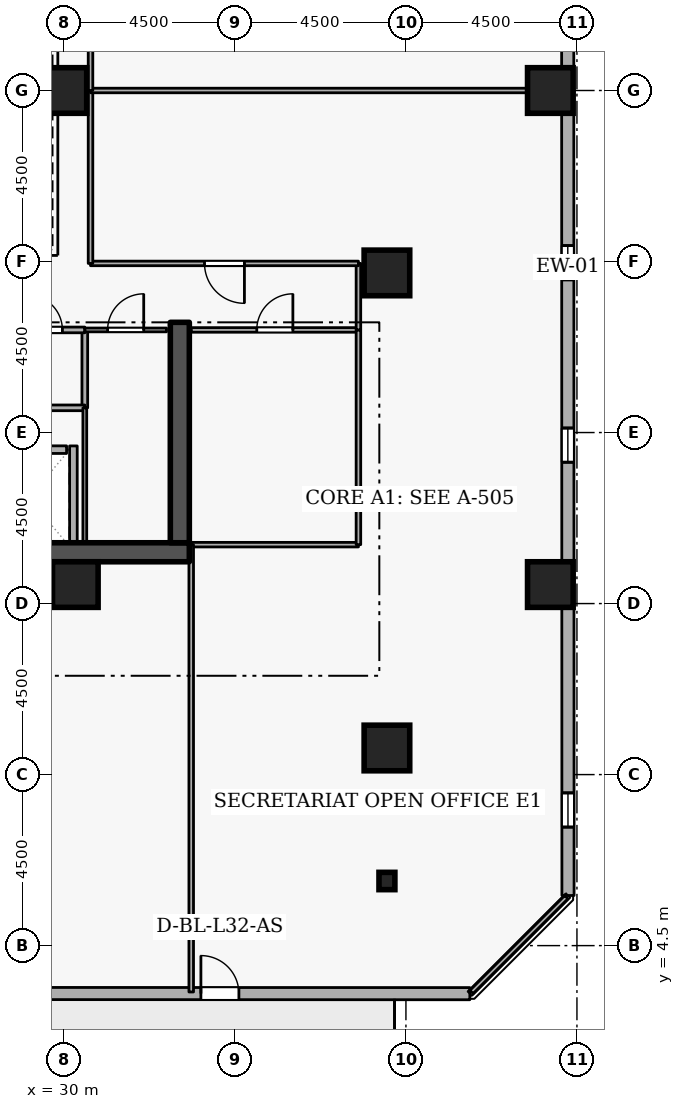
"""IFC4 building model, lengths in metres.
Left out: names, types, materials, properties, quantities, classifications, styles, units other than length and angle.
Written with IfcOpenShell. Run it as: python <this file> out.ifc"""

import sys

from ifc_helpers import new_model, si_unit, direction, frame, frame_2d, origin, origin_2d, place, context, subcontext, project, spatial, rectangle, i_section, extrude, element, fill, save


model = new_model("IFC4")
c1 = context("Model", 3, precision=1e-05, world=origin(), true_north=direction((0.0, 1.0)))
c2 = subcontext(c1, "Body", "Model", "MODEL_VIEW")
j1 = project(units=[si_unit("LENGTHUNIT", "METRE"), si_unit("PLANEANGLEUNIT", "RADIAN")], contexts=[c1])
p1 = place(None, origin())
s1 = spatial("IfcSite", under=j1, at=p1, CompositionType="ELEMENT")
p2 = place(p1, origin())
s2 = spatial("IfcBuilding", under=s1, at=p2, CompositionType="ELEMENT")
p3 = place(p2, frame((0.0, 0.0, 123.3)))
s3 = spatial("IfcBuildingStorey", under=s2, at=p3, CompositionType="ELEMENT", Elevation=123.3)
p4 = place(p3, frame((17.7, 14.85, 0.0), z_axis=(0.0, 0.0, 1.0), x_axis=(1.0, 0.0, 0.0)))
e1 = element("IfcWall", 1, at=p4, inside=s3, PredefinedType="SHEAR", context=c2, shape_type="SweptSolid", body=[
    extrude(rectangle(XDim=15.6, YDim=0.5, at=frame_2d((7.8, 0.0))), origin(), (0.0, 0.0, 1.0), 3.6),
])
p5 = place(p3, frame((33.05, 15.1, 0.0), z_axis=(0.0, 0.0, 1.0), x_axis=(0.0, 1.0, 0.0)))
e2 = element("IfcWall", 2, at=p5, inside=s3, PredefinedType="SHEAR", context=c2, shape_type="SweptSolid", body=[
    extrude(rectangle(XDim=5.8, YDim=0.5, at=frame_2d((2.9, 0.0))), origin(), (0.0, 0.0, 1.0), 3.6),
])
for number, where, z_axis, x_axis in (
    (3, (38.5, 9.7, 0.0), (0.0, 0.0, 1.0), (1.0, 0.0, 0.0)),
    (4, (42.8, 14.0, 0.0), (0.0, 0.0, 1.0), (1.0, 0.0, 0.0)),
    (5, (42.8, 27.0, 0.0), (0.0, 0.0, 1.0), (1.0, 0.0, 0.0)),
    (6, (38.5, 22.2, 0.0), (0.0, 0.0, 1.0), (1.0, 0.0, 0.0)),
    (7, (30.3, 14.0, 0.0), (0.0, 0.0, 1.0), (1.0, 0.0, 0.0)),
    (8, (30.0, 27.0, 0.0), (0.0, 0.0, 1.0), (1.0, 0.0, 0.0)),
):
    element("IfcColumn", number, at=place(p3, frame(where, z_axis=z_axis, x_axis=x_axis)), inside=s3, PredefinedType="COLUMN", context=c2, shape_type="SweptSolid", body=[
        extrude(rectangle(XDim=1.2, YDim=1.2, at=origin_2d()), origin(), (0.0, 0.0, 1.0), 3.6),
    ])
p6 = place(p3, frame((38.5, 6.2, 0.0), z_axis=(0.0, 0.0, 1.0), x_axis=(1.0, 0.0, 0.0)))
e9 = element("IfcColumn", 9, at=p6, inside=s3, PredefinedType="COLUMN", context=c2, shape_type="SweptSolid", body=[
    extrude(i_section(OverallWidth=0.418, OverallDepth=0.456, WebThickness=0.042, FlangeThickness=0.067, FilletRadius=0.015, at=origin_2d()), origin(), (0.0, 0.0, 1.0), 3.6),
])
p7 = place(p3, frame((7.628, 3.246, 0.0), z_axis=(0.0, 0.0, 1.0), x_axis=(0.999999944762, -0.000332378036, 0.0)))
e10 = element("IfcWall", 10, at=p7, inside=s3, PredefinedType="STANDARD", context=c2, shape_type="SweptSolid", body=[
    extrude(rectangle(XDim=33.054, YDim=0.32, at=frame_2d((16.527, 0.0))), origin(), (0.0, 0.0, 1.0), 2.7),
])
p8 = place(p7, frame((25.977, 0.0, 0.0)))
e11 = element("IfcOpeningElement", 11, at=p8, cuts=e10, PredefinedType="OPENING", context=c2, shape_type="SweptSolid", body=[
    extrude(rectangle(XDim=1.0, YDim=2.08, at=frame_2d((0.5, 1.04))), frame((0.0, 0.17, 0.0), z_axis=(0.0, -1.0, 0.0), x_axis=(1.0, 0.0, 0.0)), (0.0, 0.0, 1.0), 0.34),
])
p9 = place(p7, frame((1.8, 0.0, 0.72)))
e12 = element("IfcOpeningElement", 12, at=p9, cuts=e10, PredefinedType="OPENING", context=c2, shape_type="SweptSolid", body=[
    extrude(rectangle(XDim=0.9, YDim=1.75, at=frame_2d((0.45, 0.875))), frame((0.0, 0.17, 0.0), z_axis=(0.0, -1.0, 0.0), x_axis=(1.0, 0.0, 0.0)), (0.0, 0.0, 1.0), 0.34),
])
p10 = place(p7, frame((11.4, 0.0, 0.72)))
e13 = element("IfcOpeningElement", 13, at=p10, cuts=e10, PredefinedType="OPENING", context=c2, shape_type="SweptSolid", body=[
    extrude(rectangle(XDim=0.9, YDim=1.75, at=frame_2d((0.45, 0.875))), frame((0.0, 0.17, 0.0), z_axis=(0.0, -1.0, 0.0), x_axis=(1.0, 0.0, 0.0)), (0.0, 0.0, 1.0), 0.34),
])
p11 = place(p7, frame((16.2, 0.0, 0.72)))
e14 = element("IfcOpeningElement", 14, at=p11, cuts=e10, PredefinedType="OPENING", context=c2, shape_type="SweptSolid", body=[
    extrude(rectangle(XDim=0.9, YDim=1.75, at=frame_2d((0.45, 0.875))), frame((0.0, 0.17, 0.0), z_axis=(0.0, -1.0, 0.0), x_axis=(1.0, 0.0, 0.0)), (0.0, 0.0, 1.0), 0.34),
])
p12 = place(p7, frame((21.0, 0.0, 0.72)))
e15 = element("IfcOpeningElement", 15, at=p12, cuts=e10, PredefinedType="OPENING", context=c2, shape_type="SweptSolid", body=[
    extrude(rectangle(XDim=0.9, YDim=1.75, at=frame_2d((0.45, 0.875))), frame((0.0, 0.17, 0.0), z_axis=(0.0, -1.0, 0.0), x_axis=(1.0, 0.0, 0.0)), (0.0, 0.0, 1.0), 0.34),
])
p13 = place(p3, frame((43.265, 5.819, 0.0), z_axis=(0.0, 0.0, 1.0), x_axis=(-0.000332378036, 0.999999944762, 0.0)))
e16 = element("IfcWall", 16, at=p13, inside=s3, PredefinedType="STANDARD", context=c2, shape_type="SweptSolid", body=[
    extrude(rectangle(XDim=33.054, YDim=0.32, at=frame_2d((16.527, 0.0))), origin(), (0.0, 0.0, 1.0), 2.7),
])
p14 = place(p13, frame((1.8, 0.0, 0.72)))
e17 = element("IfcOpeningElement", 17, at=p14, cuts=e16, PredefinedType="OPENING", context=c2, shape_type="SweptSolid", body=[
    extrude(rectangle(XDim=0.9, YDim=1.75, at=frame_2d((0.45, 0.875))), frame((0.0, 0.17, 0.0), z_axis=(0.0, -1.0, 0.0), x_axis=(1.0, 0.0, 0.0)), (0.0, 0.0, 1.0), 0.34),
])
p15 = place(p13, frame((11.4, 0.0, 0.72)))
e18 = element("IfcOpeningElement", 18, at=p15, cuts=e16, PredefinedType="OPENING", context=c2, shape_type="SweptSolid", body=[
    extrude(rectangle(XDim=0.9, YDim=1.75, at=frame_2d((0.45, 0.875))), frame((0.0, 0.17, 0.0), z_axis=(0.0, -1.0, 0.0), x_axis=(1.0, 0.0, 0.0)), (0.0, 0.0, 1.0), 0.34),
])
p16 = place(p13, frame((16.2, 0.0, 0.72)))
e19 = element("IfcOpeningElement", 19, at=p16, cuts=e16, PredefinedType="OPENING", context=c2, shape_type="SweptSolid", body=[
    extrude(rectangle(XDim=0.9, YDim=1.75, at=frame_2d((0.45, 0.875))), frame((0.0, 0.17, 0.0), z_axis=(0.0, -1.0, 0.0), x_axis=(1.0, 0.0, 0.0)), (0.0, 0.0, 1.0), 0.34),
])
p17 = place(p13, frame((25.8, 0.0, 0.72)))
e20 = element("IfcOpeningElement", 20, at=p17, cuts=e16, PredefinedType="OPENING", context=c2, shape_type="SweptSolid", body=[
    extrude(rectangle(XDim=0.9, YDim=1.75, at=frame_2d((0.45, 0.875))), frame((0.0, 0.17, 0.0), z_axis=(0.0, -1.0, 0.0), x_axis=(1.0, 0.0, 0.0)), (0.0, 0.0, 1.0), 0.34),
])
p18 = place(p3, frame((28.08, 17.55, 0.0), z_axis=(0.0, 0.0, 1.0), x_axis=(1.0, 0.0, 0.0)))
e21 = element("IfcWall", 21, at=p18, inside=s3, PredefinedType="STANDARD", context=c2, shape_type="SweptSolid", body=[
    extrude(rectangle(XDim=1.99, YDim=0.2, at=frame_2d((0.995, 0.0))), origin(), (0.0, 0.0, 1.0), 3.34),
])
p19 = place(p3, frame((30.25, 15.112, 0.0), z_axis=(0.0, 0.0, 1.0), x_axis=(0.0, 1.0, 0.0)))
e22 = element("IfcWall", 22, at=p19, inside=s3, PredefinedType="STANDARD", context=c2, shape_type="SweptSolid", body=[
    extrude(rectangle(XDim=2.536, YDim=0.2, at=frame_2d((1.268, 0.0))), origin(), (0.0, 0.0, 1.0), 3.34),
])
p20 = place(p3, frame((30.55, 20.7, 0.0), z_axis=(0.0, 0.0, 1.0), x_axis=(0.0, -1.0, 0.0)))
e23 = element("IfcWall", 23, at=p20, inside=s3, PredefinedType="PARTITIONING", context=c2, shape_type="SweptSolid", body=[
    extrude(rectangle(XDim=2.05, YDim=0.15, at=frame_2d((1.025, 0.0))), origin(), (0.0, 0.0, 1.0), 3.34),
])
p21 = place(p3, frame((30.55, 18.65, 0.0), z_axis=(0.0, 0.0, 1.0), x_axis=(-1.0, 0.0, 0.0)))
e24 = element("IfcWall", 24, at=p21, inside=s3, PredefinedType="PARTITIONING", context=c2, shape_type="SweptSolid", body=[
    extrude(rectangle(XDim=2.1, YDim=0.15, at=frame_2d((1.05, 0.0))), origin(), (0.0, 0.0, 1.0), 3.34),
])
p22 = place(p3, frame((28.45, 20.7, 0.0), z_axis=(0.0, 0.0, 1.0), x_axis=(1.0, 0.0, 0.0)))
e25 = element("IfcWall", 25, at=p22, inside=s3, PredefinedType="PARTITIONING", context=c2, shape_type="SweptSolid", body=[
    extrude(rectangle(XDim=2.1, YDim=0.15, at=frame_2d((1.05, 0.0))), origin(), (0.0, 0.0, 1.0), 3.34),
])
p23 = place(p22, frame((0.59, 0.0, 0.0)))
e26 = element("IfcOpeningElement", 26, at=p23, cuts=e25, PredefinedType="OPENING", context=c2, shape_type="SweptSolid", body=[
    extrude(rectangle(XDim=0.92, YDim=2.08, at=frame_2d((0.46, 1.04))), frame((0.0, 0.085, 0.0), z_axis=(0.0, -1.0, 0.0), x_axis=(1.0, 0.0, 0.0)), (0.0, 0.0, 1.0), 0.17),
])
p24 = place(p3, frame((30.55, 15.1, 0.0), z_axis=(0.0, 0.0, 1.0), x_axis=(0.0, 1.0, 0.0)))
e27 = element("IfcWall", 27, at=p24, inside=s3, PredefinedType="PARTITIONING", context=c2, shape_type="SweptSolid", body=[
    extrude(rectangle(XDim=3.55, YDim=0.1, at=frame_2d((1.775, 0.0))), origin(), (0.0, 0.0, 1.0), 3.34),
])
p25 = place(p3, frame((30.55, 20.7, 0.0), z_axis=(0.0, 0.0, 1.0), x_axis=(1.0, 0.0, 0.0)))
e28 = element("IfcWall", 28, at=p25, inside=s3, PredefinedType="PARTITIONING", context=c2, shape_type="SweptSolid", body=[
    extrude(rectangle(XDim=2.15, YDim=0.1, at=frame_2d((1.075, 0.0))), origin(), (0.0, 0.0, 1.0), 3.34),
])
p26 = place(p25, frame((0.6, 0.0, 0.0)))
e29 = element("IfcOpeningElement", 29, at=p26, cuts=e28, PredefinedType="OPENING", context=c2, shape_type="SweptSolid", body=[
    extrude(rectangle(XDim=0.95, YDim=2.1, at=frame_2d((0.475, 1.05))), frame((0.0, 0.06, 0.0), z_axis=(0.0, -1.0, 0.0), x_axis=(1.0, 0.0, 0.0)), (0.0, 0.0, 1.0), 0.12),
])
p27 = place(p3, frame((37.75, 15.05, 0.0), z_axis=(0.0, 0.0, 1.0), x_axis=(-1.0, 0.0, 0.0)))
e30 = element("IfcWall", 30, at=p27, inside=s3, PredefinedType="PARTITIONING", context=c2, shape_type="SweptSolid", body=[
    extrude(rectangle(XDim=4.4, YDim=0.12, at=frame_2d((2.2, 0.0))), origin(), (0.0, 0.0, 1.0), 3.34),
])
p28 = place(p3, frame((33.35, 20.7, 0.0), z_axis=(0.0, 0.0, 1.0), x_axis=(1.0, 0.0, 0.0)))
e31 = element("IfcWall", 31, at=p28, inside=s3, PredefinedType="PARTITIONING", context=c2, shape_type="SweptSolid", body=[
    extrude(rectangle(XDim=4.4, YDim=0.12, at=frame_2d((2.2, 0.0))), origin(), (0.0, 0.0, 1.0), 3.34),
])
p29 = place(p28, frame((1.725, 0.0, 0.0)))
e32 = element("IfcOpeningElement", 32, at=p29, cuts=e31, PredefinedType="OPENING", context=c2, shape_type="SweptSolid", body=[
    extrude(rectangle(XDim=0.95, YDim=2.1, at=frame_2d((0.475, 1.05))), frame((0.0, 0.07, 0.0), z_axis=(0.0, -1.0, 0.0), x_axis=(1.0, 0.0, 0.0)), (0.0, 0.0, 1.0), 0.14),
])
p30 = place(p3, frame((37.75, 20.7, 0.0), z_axis=(0.0, 0.0, 1.0), x_axis=(0.0, -1.0, 0.0)))
e33 = element("IfcWall", 33, at=p30, inside=s3, PredefinedType="PARTITIONING", context=c2, shape_type="SweptSolid", body=[
    extrude(rectangle(XDim=5.65, YDim=0.12, at=frame_2d((2.825, 0.0))), origin(), (0.0, 0.0, 1.0), 3.34),
])
p31 = place(p3, frame((33.35, 3.28, 0.0), z_axis=(0.0, 0.0, 1.0), x_axis=(0.0, 1.0, 0.0)))
e34 = element("IfcWall", 34, at=p31, inside=s3, PredefinedType="PARTITIONING", context=c2, shape_type="SweptSolid", body=[
    extrude(rectangle(XDim=11.77, YDim=0.12, at=frame_2d((5.885, 0.0))), origin(), (0.0, 0.0, 1.0), 2.545),
])
p32 = place(p3, frame((37.75, 20.7, 0.0), z_axis=(0.0, 0.0, 1.0), x_axis=(0.0, 1.0, 0.0)))
e35 = element("IfcWall", 35, at=p32, inside=s3, PredefinedType="PARTITIONING", context=c2, shape_type="SweptSolid", body=[
    extrude(rectangle(XDim=1.75, YDim=0.12, at=frame_2d((0.875, 0.0))), origin(), (0.0, 0.0, 1.0), 3.34),
])
p33 = place(p3, frame((37.75, 22.45, 0.0), z_axis=(0.0, 0.0, 1.0), x_axis=(-1.0, 0.0, 0.0)))
e36 = element("IfcWall", 36, at=p33, inside=s3, PredefinedType="PARTITIONING", context=c2, shape_type="SweptSolid", body=[
    extrude(rectangle(XDim=7.05, YDim=0.12, at=frame_2d((3.525, 0.0))), origin(), (0.0, 0.0, 1.0), 3.34),
])
p34 = place(p33, frame((3.0, 0.0, 0.0)))
e37 = element("IfcOpeningElement", 37, at=p34, cuts=e36, PredefinedType="OPENING", context=c2, shape_type="SweptSolid", body=[
    extrude(rectangle(XDim=1.05, YDim=2.1, at=frame_2d((0.525, 1.05))), frame((0.0, 0.07, 0.0), z_axis=(0.0, -1.0, 0.0), x_axis=(1.0, 0.0, 0.0)), (0.0, 0.0, 1.0), 0.14),
])
p35 = place(p3, frame((30.7, 22.45, 0.0), z_axis=(0.0, 0.0, 1.0), x_axis=(0.0, 1.0, 0.0)))
e38 = element("IfcWall", 38, at=p35, inside=s3, PredefinedType="PARTITIONING", context=c2, shape_type="SweptSolid", body=[
    extrude(rectangle(XDim=4.55, YDim=0.12, at=frame_2d((2.275, 0.0))), origin(), (0.0, 0.0, 1.0), 3.34),
])
p36 = place(p3, frame((30.7, 27.0, 0.0), z_axis=(0.0, 0.0, 1.0), x_axis=(1.0, 0.0, 0.0)))
e39 = element("IfcWall", 39, at=p36, inside=s3, PredefinedType="PARTITIONING", context=c2, shape_type="SweptSolid", body=[
    extrude(rectangle(XDim=12.52, YDim=0.12, at=frame_2d((6.26, 0.0))), origin(), (0.0, 0.0, 1.0), 2.932),
])
p37 = place(p3, frame((43.22, 5.775, 0.0), z_axis=(0.0, 0.0, 1.0), x_axis=(-0.707106781187, -0.707106781187, 0.0)))
e40 = element("IfcWall", 40, at=p37, inside=s3, PredefinedType="PARTITIONING", context=c2, shape_type="SweptSolid", body=[
    extrude(rectangle(XDim=3.528, YDim=0.12, at=frame_2d((1.764, 0.0))), origin(), (0.0, 0.0, 1.0), 3.34),
])
p38 = place(p3, frame((30.7, 27.0, 0.0), z_axis=(0.0, 0.0, 1.0), x_axis=(0.0, 1.0, 0.0)))
e41 = element("IfcWall", 41, at=p38, inside=s3, PredefinedType="PARTITIONING", context=c2, shape_type="SweptSolid", body=[
    extrude(rectangle(XDim=4.55, YDim=0.12, at=frame_2d((2.275, 0.0))), origin(), (0.0, 0.0, 1.0), 3.34),
])
p39 = place(p8, origin())
e42 = element("IfcDoor", 42, at=p39, inside=s3, OperationType="SINGLE_SWING_LEFT", PredefinedType="DOOR", context=c2, shape_type="SweptSolid", body=[
    extrude(rectangle(XDim=1.0, YDim=2.08, at=frame_2d((0.5, 1.04))), frame((0.0, 0.025, 0.0), z_axis=(0.0, -1.0, 0.0), x_axis=(1.0, 0.0, 0.0)), (0.0, 0.0, 1.0), 0.05),
])
fill(e11, e42)
p40 = place(p14, origin())
e43 = element("IfcWindow", 43, at=p40, inside=s3, PartitioningType="SINGLE_PANEL", PredefinedType="WINDOW", context=c2, shape_type="SweptSolid", body=[
    extrude(rectangle(XDim=0.9, YDim=1.75, at=frame_2d((0.45, 0.875))), frame((0.0, 0.03, 0.0), z_axis=(0.0, -1.0, 0.0), x_axis=(1.0, 0.0, 0.0)), (0.0, 0.0, 1.0), 0.06),
])
fill(e17, e43)
p41 = place(p15, origin())
e44 = element("IfcWindow", 44, at=p41, inside=s3, PartitioningType="SINGLE_PANEL", PredefinedType="WINDOW", context=c2, shape_type="SweptSolid", body=[
    extrude(rectangle(XDim=0.9, YDim=1.75, at=frame_2d((0.45, 0.875))), frame((0.0, 0.03, 0.0), z_axis=(0.0, -1.0, 0.0), x_axis=(1.0, 0.0, 0.0)), (0.0, 0.0, 1.0), 0.06),
])
fill(e18, e44)
p42 = place(p16, origin())
e45 = element("IfcWindow", 45, at=p42, inside=s3, PartitioningType="SINGLE_PANEL", PredefinedType="WINDOW", context=c2, shape_type="SweptSolid", body=[
    extrude(rectangle(XDim=0.9, YDim=1.75, at=frame_2d((0.45, 0.875))), frame((0.0, 0.03, 0.0), z_axis=(0.0, -1.0, 0.0), x_axis=(1.0, 0.0, 0.0)), (0.0, 0.0, 1.0), 0.06),
])
fill(e19, e45)
p43 = place(p23, origin())
e46 = element("IfcDoor", 46, at=p43, inside=s3, OperationType="SINGLE_SWING_LEFT", PredefinedType="DOOR", context=c2, shape_type="SweptSolid", body=[
    extrude(rectangle(XDim=0.92, YDim=2.08, at=frame_2d((0.46, 1.04))), frame((0.0, 0.025, 0.0), z_axis=(0.0, -1.0, 0.0), x_axis=(1.0, 0.0, 0.0)), (0.0, 0.0, 1.0), 0.05),
])
fill(e26, e46)
p44 = place(p26, origin())
e47 = element("IfcDoor", 47, at=p44, inside=s3, OperationType="SINGLE_SWING_RIGHT", PredefinedType="DOOR", context=c2, shape_type="SweptSolid", body=[
    extrude(rectangle(XDim=0.95, YDim=2.1, at=frame_2d((0.475, 1.05))), frame((0.0, 0.025, 0.0), z_axis=(0.0, -1.0, 0.0), x_axis=(1.0, 0.0, 0.0)), (0.0, 0.0, 1.0), 0.05),
])
fill(e29, e47)
p45 = place(p29, origin())
e48 = element("IfcDoor", 48, at=p45, inside=s3, OperationType="SINGLE_SWING_RIGHT", PredefinedType="DOOR", context=c2, shape_type="SweptSolid", body=[
    extrude(rectangle(XDim=0.95, YDim=2.1, at=frame_2d((0.475, 1.05))), frame((0.0, 0.025, 0.0), z_axis=(0.0, -1.0, 0.0), x_axis=(1.0, 0.0, 0.0)), (0.0, 0.0, 1.0), 0.05),
])
fill(e32, e48)
p46 = place(p34, origin())
e49 = element("IfcDoor", 49, at=p46, inside=s3, OperationType="SINGLE_SWING_LEFT", PredefinedType="DOOR", context=c2, shape_type="SweptSolid", body=[
    extrude(rectangle(XDim=1.05, YDim=2.1, at=frame_2d((0.525, 1.05))), frame((0.0, 0.025, 0.0), z_axis=(0.0, -1.0, 0.0), x_axis=(1.0, 0.0, 0.0)), (0.0, 0.0, 1.0), 0.05),
])
fill(e37, e49)
save(model, sys.argv[1])
